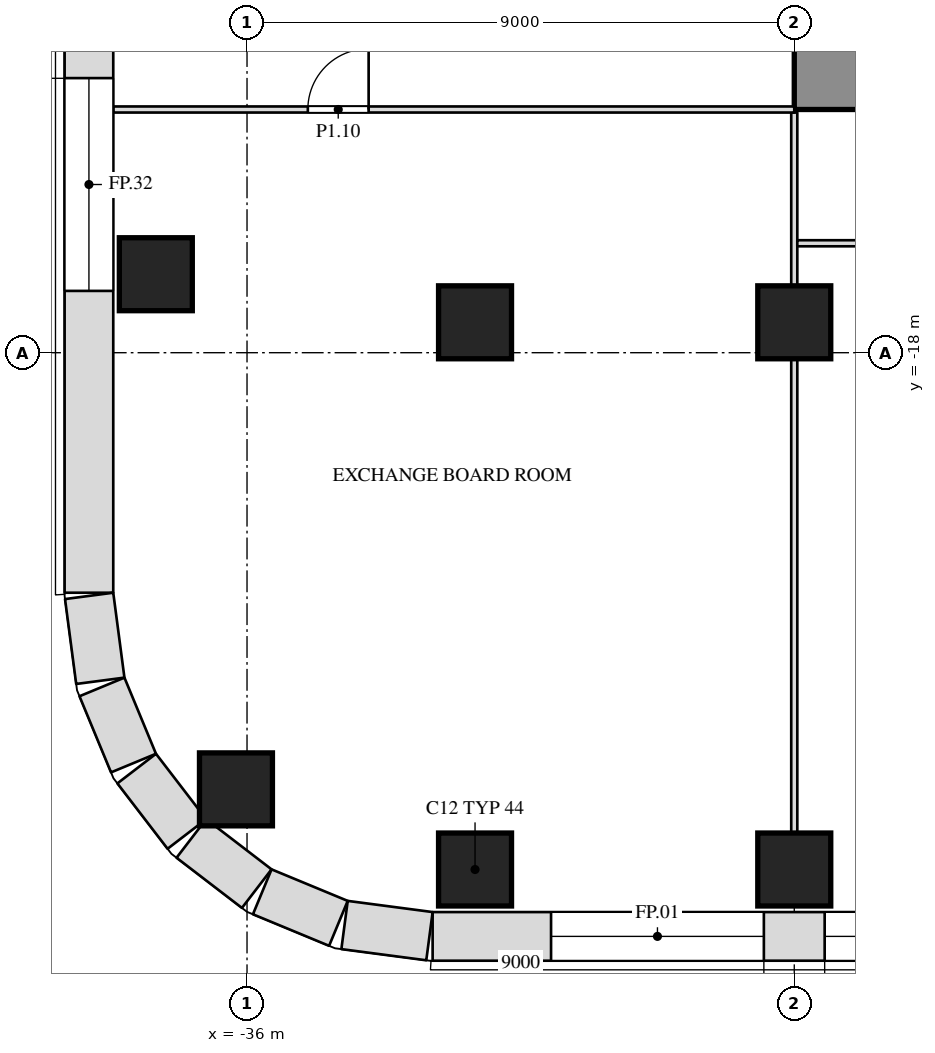
"""IFC4 building model, lengths in metres.
Left out: names, types, materials, properties, quantities, classifications, styles, units other than length and angle.
Written with IfcOpenShell. Run it as: python <this file> out.ifc"""

import sys

from ifc_helpers import new_model, si_unit, direction, frame, frame_2d, origin, origin_2d, place, context, subcontext, project, spatial, rectangle, extrude, element, fill, save


model = new_model("IFC4")
c1 = context("Model", 3, precision=1e-05, world=origin(), true_north=direction((0.0, 1.0)))
c2 = subcontext(c1, "Body", "Model", "MODEL_VIEW")
j1 = project(units=[si_unit("LENGTHUNIT", "METRE"), si_unit("PLANEANGLEUNIT", "RADIAN")], contexts=[c1])
p1 = place(None, origin())
s1 = spatial("IfcSite", under=j1, at=p1, CompositionType="ELEMENT")
p2 = place(p1, origin())
s2 = spatial("IfcBuilding", under=s1, at=p2, CompositionType="ELEMENT")
p3 = place(p2, frame((0.0, 0.0, 9.0)))
s3 = spatial("IfcBuildingStorey", under=s2, at=p3, CompositionType="ELEMENT", Elevation=9.0)
for number, where, z_axis, x_axis in (
    (1, (-32.25, -26.5, 0.0), (0.0, 0.0, 1.0), (1.0, 0.0, 0.0)),
    (2, (-27.0, -26.5, 0.0), (0.0, 0.0, 1.0), (1.0, 0.0, 0.0)),
    (3, (-36.182, -25.182, 0.0), (0.0, 0.0, 1.0), (1.0, 0.0, 0.0)),
    (4, (-32.25, -17.5, 0.0), (0.0, 0.0, 1.0), (1.0, 0.0, 0.0)),
    (5, (-27.0, -17.5, 0.0), (0.0, 0.0, 1.0), (1.0, 0.0, 0.0)),
    (6, (-37.5, -16.709, 0.0), (0.0, 0.0, 1.0), (1.0, 0.0, 0.0)),
):
    element("IfcColumn", number, at=place(p3, frame(where, z_axis=z_axis, x_axis=x_axis)), inside=s3, PredefinedType="COLUMN", context=c2, shape_type="SweptSolid", body=[
        extrude(rectangle(XDim=1.2, YDim=1.2, at=origin_2d()), origin(), (0.0, 0.0, 1.0), 6.0),
    ])
p4 = place(p3, frame((-27.0, -13.4, 0.0), z_axis=(0.0, 0.0, 1.0), x_axis=(1.0, 0.0, 0.0)))
e7 = element("IfcWall", 7, at=p4, inside=s3, PredefinedType="SHEAR", context=c2, shape_type="SweptSolid", body=[
    extrude(rectangle(XDim=54.0, YDim=1.2, at=frame_2d((27.0, 0.0))), origin(), (0.0, 0.0, 1.0), 5.7),
])
p5 = place(p4, frame((16.45, 0.0, 0.0)))
e8 = element("IfcOpeningElement", 8, at=p5, cuts=e7, PredefinedType="OPENING", context=c2, shape_type="SweptSolid", body=[
    extrude(rectangle(XDim=1.0, YDim=2.1, at=frame_2d((0.5, 1.05))), frame((0.0, 0.612, 0.0), z_axis=(0.0, -1.0, 0.0), x_axis=(1.0, 0.0, 0.0)), (0.0, 0.0, 1.0), 1.224),
])
p6 = place(p4, frame((36.55, 0.0, 0.0)))
e9 = element("IfcOpeningElement", 9, at=p6, cuts=e7, PredefinedType="OPENING", context=c2, shape_type="SweptSolid", body=[
    extrude(rectangle(XDim=1.0, YDim=2.1, at=frame_2d((0.5, 1.05))), frame((0.0, 0.612, 0.0), z_axis=(0.0, -1.0, 0.0), x_axis=(1.0, 0.0, 0.0)), (0.0, 0.0, 1.0), 1.224),
])
p7 = place(p3, frame((-27.0, -25.9, 0.0), z_axis=(0.0, 0.0, 1.0), x_axis=(0.0, 1.0, 0.0)))
e10 = element("IfcWall", 10, at=p7, inside=s3, PredefinedType="PARTITIONING", context=c2, shape_type="SweptSolid", body=[
    extrude(rectangle(XDim=7.8, YDim=0.1, at=frame_2d((3.9, 0.0))), origin(), (0.0, 0.0, 1.0), 5.088),
])
p8 = place(p3, frame((-27.0, -16.9, 0.0), z_axis=(0.0, 0.0, 1.0), x_axis=(0.0, 1.0, 0.0)))
e11 = element("IfcWall", 11, at=p8, inside=s3, PredefinedType="PARTITIONING", context=c2, shape_type="SweptSolid", body=[
    extrude(rectangle(XDim=2.85, YDim=0.1, at=frame_2d((1.425, 0.0))), origin(), (0.0, 0.0, 1.0), 5.088),
])
p9 = place(p3, frame((-26.95, -16.2, 0.0), z_axis=(0.0, 0.0, 1.0), x_axis=(1.0, 0.0, 0.0)))
e12 = element("IfcWall", 12, at=p9, inside=s3, PredefinedType="PARTITIONING", context=c2, shape_type="SweptSolid", body=[
    extrude(rectangle(XDim=26.25, YDim=0.1, at=frame_2d((13.125, 0.0))), origin(), (0.0, 0.0, 1.0), 5.7),
])
p10 = place(p9, frame((3.95, 0.0, 0.0)))
e13 = element("IfcOpeningElement", 13, at=p10, cuts=e12, PredefinedType="OPENING", context=c2, shape_type="SweptSolid", body=[
    extrude(rectangle(XDim=1.0, YDim=2.1, at=frame_2d((0.5, 1.05))), frame((0.0, 0.062, 0.0), z_axis=(0.0, -1.0, 0.0), x_axis=(1.0, 0.0, 0.0)), (0.0, 0.0, 1.0), 0.124),
])
p11 = place(p9, frame((12.95, 0.0, 0.0)))
e14 = element("IfcOpeningElement", 14, at=p11, cuts=e12, PredefinedType="OPENING", context=c2, shape_type="SweptSolid", body=[
    extrude(rectangle(XDim=1.0, YDim=2.1, at=frame_2d((0.5, 1.05))), frame((0.0, 0.062, 0.0), z_axis=(0.0, -1.0, 0.0), x_axis=(1.0, 0.0, 0.0)), (0.0, 0.0, 1.0), 0.124),
])
p12 = place(p9, frame((21.95, 0.0, 0.0)))
e15 = element("IfcOpeningElement", 15, at=p12, cuts=e12, PredefinedType="OPENING", context=c2, shape_type="SweptSolid", body=[
    extrude(rectangle(XDim=1.0, YDim=2.1, at=frame_2d((0.5, 1.05))), frame((0.0, 0.062, 0.0), z_axis=(0.0, -1.0, 0.0), x_axis=(1.0, 0.0, 0.0)), (0.0, 0.0, 1.0), 0.124),
])
p13 = place(p3, frame((-38.2, -14.0, 0.0), z_axis=(0.0, 0.0, 1.0), x_axis=(1.0, 0.0, 0.0)))
e16 = element("IfcWall", 16, at=p13, inside=s3, PredefinedType="PARTITIONING", context=c2, shape_type="SweptSolid", body=[
    extrude(rectangle(XDim=11.2, YDim=0.1, at=frame_2d((5.6, 0.0))), origin(), (0.0, 0.0, 1.0), 5.7),
])
p14 = place(p13, frame((3.2, 0.0, 0.0)))
e17 = element("IfcOpeningElement", 17, at=p14, cuts=e16, PredefinedType="OPENING", context=c2, shape_type="SweptSolid", body=[
    extrude(rectangle(XDim=1.0, YDim=2.1, at=frame_2d((0.5, 1.05))), frame((0.0, 0.062, 0.0), z_axis=(0.0, -1.0, 0.0), x_axis=(1.0, 0.0, 0.0)), (0.0, 0.0, 1.0), 0.124),
])
p15 = place(p3, frame((-32.948, -27.6, 0.0), z_axis=(0.0, 0.0, 1.0), x_axis=(1.0, 0.0, 0.0)))
e18 = element("IfcWall", 18, at=p15, inside=s3, PredefinedType="SOLIDWALL", context=c2, shape_type="SweptSolid", body=[
    extrude(rectangle(XDim=65.895, YDim=0.8, at=frame_2d((32.948, 0.0))), origin(), (0.0, 0.0, 1.0), 5.7),
])
p16 = place(p15, frame((1.948, 0.0, 1.0)))
e19 = element("IfcOpeningElement", 19, at=p16, cuts=e18, PredefinedType="OPENING", context=c2, shape_type="SweptSolid", body=[
    extrude(rectangle(XDim=3.5, YDim=4.0, at=frame_2d((1.75, 2.0))), frame((0.0, 0.412, 0.0), z_axis=(0.0, -1.0, 0.0), x_axis=(1.0, 0.0, 0.0)), (0.0, 0.0, 1.0), 0.824),
])
p17 = place(p15, frame((6.448, 0.0, 1.0)))
e20 = element("IfcOpeningElement", 20, at=p17, cuts=e18, PredefinedType="OPENING", context=c2, shape_type="SweptSolid", body=[
    extrude(rectangle(XDim=3.5, YDim=4.0, at=frame_2d((1.75, 2.0))), frame((0.0, 0.412, 0.0), z_axis=(0.0, -1.0, 0.0), x_axis=(1.0, 0.0, 0.0)), (0.0, 0.0, 1.0), 0.824),
])
p18 = place(p15, frame((10.948, 0.0, 1.0)))
e21 = element("IfcOpeningElement", 21, at=p18, cuts=e18, PredefinedType="OPENING", context=c2, shape_type="SweptSolid", body=[
    extrude(rectangle(XDim=3.5, YDim=4.0, at=frame_2d((1.75, 2.0))), frame((0.0, 0.412, 0.0), z_axis=(0.0, -1.0, 0.0), x_axis=(1.0, 0.0, 0.0)), (0.0, 0.0, 1.0), 0.824),
])
p19 = place(p15, frame((15.448, 0.0, 1.0)))
e22 = element("IfcOpeningElement", 22, at=p19, cuts=e18, PredefinedType="OPENING", context=c2, shape_type="SweptSolid", body=[
    extrude(rectangle(XDim=3.5, YDim=4.0, at=frame_2d((1.75, 2.0))), frame((0.0, 0.412, 0.0), z_axis=(0.0, -1.0, 0.0), x_axis=(1.0, 0.0, 0.0)), (0.0, 0.0, 1.0), 0.824),
])
p20 = place(p15, frame((19.948, 0.0, 1.0)))
e23 = element("IfcOpeningElement", 23, at=p20, cuts=e18, PredefinedType="OPENING", context=c2, shape_type="SweptSolid", body=[
    extrude(rectangle(XDim=3.5, YDim=4.0, at=frame_2d((1.75, 2.0))), frame((0.0, 0.412, 0.0), z_axis=(0.0, -1.0, 0.0), x_axis=(1.0, 0.0, 0.0)), (0.0, 0.0, 1.0), 0.824),
])
p21 = place(p15, frame((24.448, 0.0, 1.0)))
e24 = element("IfcOpeningElement", 24, at=p21, cuts=e18, PredefinedType="OPENING", context=c2, shape_type="SweptSolid", body=[
    extrude(rectangle(XDim=3.5, YDim=4.0, at=frame_2d((1.75, 2.0))), frame((0.0, 0.412, 0.0), z_axis=(0.0, -1.0, 0.0), x_axis=(1.0, 0.0, 0.0)), (0.0, 0.0, 1.0), 0.824),
])
p22 = place(p15, frame((28.948, 0.0, 1.0)))
e25 = element("IfcOpeningElement", 25, at=p22, cuts=e18, PredefinedType="OPENING", context=c2, shape_type="SweptSolid", body=[
    extrude(rectangle(XDim=3.5, YDim=4.0, at=frame_2d((1.75, 2.0))), frame((0.0, 0.412, 0.0), z_axis=(0.0, -1.0, 0.0), x_axis=(1.0, 0.0, 0.0)), (0.0, 0.0, 1.0), 0.824),
])
p23 = place(p15, frame((33.448, 0.0, 1.0)))
e26 = element("IfcOpeningElement", 26, at=p23, cuts=e18, PredefinedType="OPENING", context=c2, shape_type="SweptSolid", body=[
    extrude(rectangle(XDim=3.5, YDim=4.0, at=frame_2d((1.75, 2.0))), frame((0.0, 0.412, 0.0), z_axis=(0.0, -1.0, 0.0), x_axis=(1.0, 0.0, 0.0)), (0.0, 0.0, 1.0), 0.824),
])
p24 = place(p15, frame((37.948, 0.0, 1.0)))
e27 = element("IfcOpeningElement", 27, at=p24, cuts=e18, PredefinedType="OPENING", context=c2, shape_type="SweptSolid", body=[
    extrude(rectangle(XDim=3.5, YDim=4.0, at=frame_2d((1.75, 2.0))), frame((0.0, 0.412, 0.0), z_axis=(0.0, -1.0, 0.0), x_axis=(1.0, 0.0, 0.0)), (0.0, 0.0, 1.0), 0.824),
])
p25 = place(p15, frame((42.448, 0.0, 1.0)))
e28 = element("IfcOpeningElement", 28, at=p25, cuts=e18, PredefinedType="OPENING", context=c2, shape_type="SweptSolid", body=[
    extrude(rectangle(XDim=3.5, YDim=4.0, at=frame_2d((1.75, 2.0))), frame((0.0, 0.412, 0.0), z_axis=(0.0, -1.0, 0.0), x_axis=(1.0, 0.0, 0.0)), (0.0, 0.0, 1.0), 0.824),
])
p26 = place(p15, frame((46.948, 0.0, 1.0)))
e29 = element("IfcOpeningElement", 29, at=p26, cuts=e18, PredefinedType="OPENING", context=c2, shape_type="SweptSolid", body=[
    extrude(rectangle(XDim=3.5, YDim=4.0, at=frame_2d((1.75, 2.0))), frame((0.0, 0.412, 0.0), z_axis=(0.0, -1.0, 0.0), x_axis=(1.0, 0.0, 0.0)), (0.0, 0.0, 1.0), 0.824),
])
p27 = place(p15, frame((51.448, 0.0, 1.0)))
e30 = element("IfcOpeningElement", 30, at=p27, cuts=e18, PredefinedType="OPENING", context=c2, shape_type="SweptSolid", body=[
    extrude(rectangle(XDim=3.5, YDim=4.0, at=frame_2d((1.75, 2.0))), frame((0.0, 0.412, 0.0), z_axis=(0.0, -1.0, 0.0), x_axis=(1.0, 0.0, 0.0)), (0.0, 0.0, 1.0), 0.824),
])
p28 = place(p15, frame((55.948, 0.0, 1.0)))
e31 = element("IfcOpeningElement", 31, at=p28, cuts=e18, PredefinedType="OPENING", context=c2, shape_type="SweptSolid", body=[
    extrude(rectangle(XDim=3.5, YDim=4.0, at=frame_2d((1.75, 2.0))), frame((0.0, 0.412, 0.0), z_axis=(0.0, -1.0, 0.0), x_axis=(1.0, 0.0, 0.0)), (0.0, 0.0, 1.0), 0.824),
])
p29 = place(p15, frame((60.448, 0.0, 1.0)))
e32 = element("IfcOpeningElement", 32, at=p29, cuts=e18, PredefinedType="OPENING", context=c2, shape_type="SweptSolid", body=[
    extrude(rectangle(XDim=3.5, YDim=4.0, at=frame_2d((1.75, 2.0))), frame((0.0, 0.412, 0.0), z_axis=(0.0, -1.0, 0.0), x_axis=(1.0, 0.0, 0.0)), (0.0, 0.0, 1.0), 0.824),
])
p30 = place(p3, frame((-38.6, 13.948, 0.0), z_axis=(0.0, 0.0, 1.0), x_axis=(0.0, -1.0, 0.0)))
e33 = element("IfcWall", 33, at=p30, inside=s3, PredefinedType="SOLIDWALL", context=c2, shape_type="SweptSolid", body=[
    extrude(rectangle(XDim=35.895, YDim=0.8, at=frame_2d((17.948, 0.0))), origin(), (0.0, 0.0, 1.0), 5.7),
])
p31 = place(p30, frame((4.964, 0.0, 1.0)))
e34 = element("IfcOpeningElement", 34, at=p31, cuts=e33, PredefinedType="OPENING", context=c2, shape_type="SweptSolid", body=[
    extrude(rectangle(XDim=3.5, YDim=4.0, at=frame_2d((1.75, 2.0))), frame((0.0, 0.412, 0.0), z_axis=(0.0, -1.0, 0.0), x_axis=(1.0, 0.0, 0.0)), (0.0, 0.0, 1.0), 0.824),
])
p32 = place(p30, frame((9.458, 0.0, 1.0)))
e35 = element("IfcOpeningElement", 35, at=p32, cuts=e33, PredefinedType="OPENING", context=c2, shape_type="SweptSolid", body=[
    extrude(rectangle(XDim=3.5, YDim=4.0, at=frame_2d((1.75, 2.0))), frame((0.0, 0.412, 0.0), z_axis=(0.0, -1.0, 0.0), x_axis=(1.0, 0.0, 0.0)), (0.0, 0.0, 1.0), 0.824),
])
p33 = place(p30, frame((13.951, 0.0, 1.0)))
e36 = element("IfcOpeningElement", 36, at=p33, cuts=e33, PredefinedType="OPENING", context=c2, shape_type="SweptSolid", body=[
    extrude(rectangle(XDim=3.5, YDim=4.0, at=frame_2d((1.75, 2.0))), frame((0.0, 0.412, 0.0), z_axis=(0.0, -1.0, 0.0), x_axis=(1.0, 0.0, 0.0)), (0.0, 0.0, 1.0), 0.824),
])
p34 = place(p30, frame((18.444, 0.0, 1.0)))
e37 = element("IfcOpeningElement", 37, at=p34, cuts=e33, PredefinedType="OPENING", context=c2, shape_type="SweptSolid", body=[
    extrude(rectangle(XDim=3.5, YDim=4.0, at=frame_2d((1.75, 2.0))), frame((0.0, 0.412, 0.0), z_axis=(0.0, -1.0, 0.0), x_axis=(1.0, 0.0, 0.0)), (0.0, 0.0, 1.0), 0.824),
])
p35 = place(p30, frame((22.938, 0.0, 1.0)))
e38 = element("IfcOpeningElement", 38, at=p35, cuts=e33, PredefinedType="OPENING", context=c2, shape_type="SweptSolid", body=[
    extrude(rectangle(XDim=3.5, YDim=4.0, at=frame_2d((1.75, 2.0))), frame((0.0, 0.412, 0.0), z_axis=(0.0, -1.0, 0.0), x_axis=(1.0, 0.0, 0.0)), (0.0, 0.0, 1.0), 0.824),
])
p36 = place(p30, frame((27.431, 0.0, 1.0)))
e39 = element("IfcOpeningElement", 39, at=p36, cuts=e33, PredefinedType="OPENING", context=c2, shape_type="SweptSolid", body=[
    extrude(rectangle(XDim=3.5, YDim=4.0, at=frame_2d((1.75, 2.0))), frame((0.0, 0.412, 0.0), z_axis=(0.0, -1.0, 0.0), x_axis=(1.0, 0.0, 0.0)), (0.0, 0.0, 1.0), 0.824),
])
p37 = place(p3, frame((-38.597, -22.0, 0.0), z_axis=(0.0, 0.0, 1.0), x_axis=(0.130517283865, -0.99144603414, 0.0)))
e40 = element("IfcWall", 40, at=p37, inside=s3, PredefinedType="SOLIDWALL", context=c2, shape_type="SweptSolid", body=[
    extrude(rectangle(XDim=1.408, YDim=0.8, at=frame_2d((0.704, 0.0))), origin(), (0.0, 0.0, 1.0), 5.7),
])
p38 = place(p3, frame((-38.386, -23.497, 0.0), z_axis=(0.0, 0.0, 1.0), x_axis=(0.38276009378, -0.923847774587, 0.0)))
e41 = element("IfcWall", 41, at=p38, inside=s3, PredefinedType="SOLIDWALL", context=c2, shape_type="SweptSolid", body=[
    extrude(rectangle(XDim=1.355, YDim=0.8, at=frame_2d((0.678, 0.0))), origin(), (0.0, 0.0, 1.0), 5.7),
])
for number, where, z_axis, x_axis in (
    (42, (-37.815, -24.84, 0.0), (0.0, 0.0, 1.0), (0.609, -0.793, 0.0)),
    (43, (-36.916, -25.989, 0.0), (0.0, 0.0, 1.0), (0.793, -0.609, 0.0)),
):
    element("IfcWall", number, at=place(p3, frame(where, z_axis=z_axis, x_axis=x_axis)), inside=s3, PredefinedType="SOLIDWALL", context=c2, shape_type="SweptSolid", body=[
        extrude(rectangle(XDim=1.356, YDim=0.8, at=frame_2d((0.678, 0.0))), origin(), (0.0, 0.0, 1.0), 5.7),
    ])
p39 = place(p3, frame((-35.75, -26.867, 0.0), z_axis=(0.0, 0.0, 1.0), x_axis=(0.923847774587, -0.38276009378, 0.0)))
e44 = element("IfcWall", 44, at=p39, inside=s3, PredefinedType="SOLIDWALL", context=c2, shape_type="SweptSolid", body=[
    extrude(rectangle(XDim=1.355, YDim=0.8, at=frame_2d((0.678, 0.0))), origin(), (0.0, 0.0, 1.0), 5.7),
])
p40 = place(p3, frame((-34.396, -27.413, 0.0), z_axis=(0.0, 0.0, 1.0), x_axis=(0.99144603414, -0.130517283865, 0.0)))
e45 = element("IfcWall", 45, at=p40, inside=s3, PredefinedType="SOLIDWALL", context=c2, shape_type="SweptSolid", body=[
    extrude(rectangle(XDim=1.408, YDim=0.8, at=frame_2d((0.704, 0.0))), origin(), (0.0, 0.0, 1.0), 5.7),
])
p41 = place(p14, origin())
e46 = element("IfcDoor", 46, at=p41, inside=s3, OperationType="SINGLE_SWING_RIGHT", PredefinedType="DOOR", context=c2, shape_type="SweptSolid", body=[
    extrude(rectangle(XDim=1.0, YDim=2.1, at=frame_2d((0.5, 1.05))), frame((0.0, 0.025, 0.0), z_axis=(0.0, -1.0, 0.0), x_axis=(1.0, 0.0, 0.0)), (0.0, 0.0, 1.0), 0.05),
])
fill(e17, e46)
p42 = place(p16, origin())
e47 = element("IfcWindow", 47, at=p42, inside=s3, PartitioningType="SINGLE_PANEL", PredefinedType="WINDOW", context=c2, shape_type="SweptSolid", body=[
    extrude(rectangle(XDim=3.5, YDim=4.0, at=frame_2d((1.75, 2.0))), frame((0.0, 0.03, 0.0), z_axis=(0.0, -1.0, 0.0), x_axis=(1.0, 0.0, 0.0)), (0.0, 0.0, 1.0), 0.06),
])
fill(e19, e47)
p43 = place(p17, origin())
e48 = element("IfcWindow", 48, at=p43, inside=s3, PartitioningType="SINGLE_PANEL", PredefinedType="WINDOW", context=c2, shape_type="SweptSolid", body=[
    extrude(rectangle(XDim=3.5, YDim=4.0, at=frame_2d((1.75, 2.0))), frame((0.0, 0.03, 0.0), z_axis=(0.0, -1.0, 0.0), x_axis=(1.0, 0.0, 0.0)), (0.0, 0.0, 1.0), 0.06),
])
fill(e20, e48)
p44 = place(p36, origin())
e49 = element("IfcWindow", 49, at=p44, inside=s3, PartitioningType="SINGLE_PANEL", PredefinedType="WINDOW", context=c2, shape_type="SweptSolid", body=[
    extrude(rectangle(XDim=3.5, YDim=4.0, at=frame_2d((1.75, 2.0))), frame((0.0, 0.03, 0.0), z_axis=(0.0, -1.0, 0.0), x_axis=(1.0, 0.0, 0.0)), (0.0, 0.0, 1.0), 0.06),
])
fill(e39, e49)
save(model, sys.argv[1])
